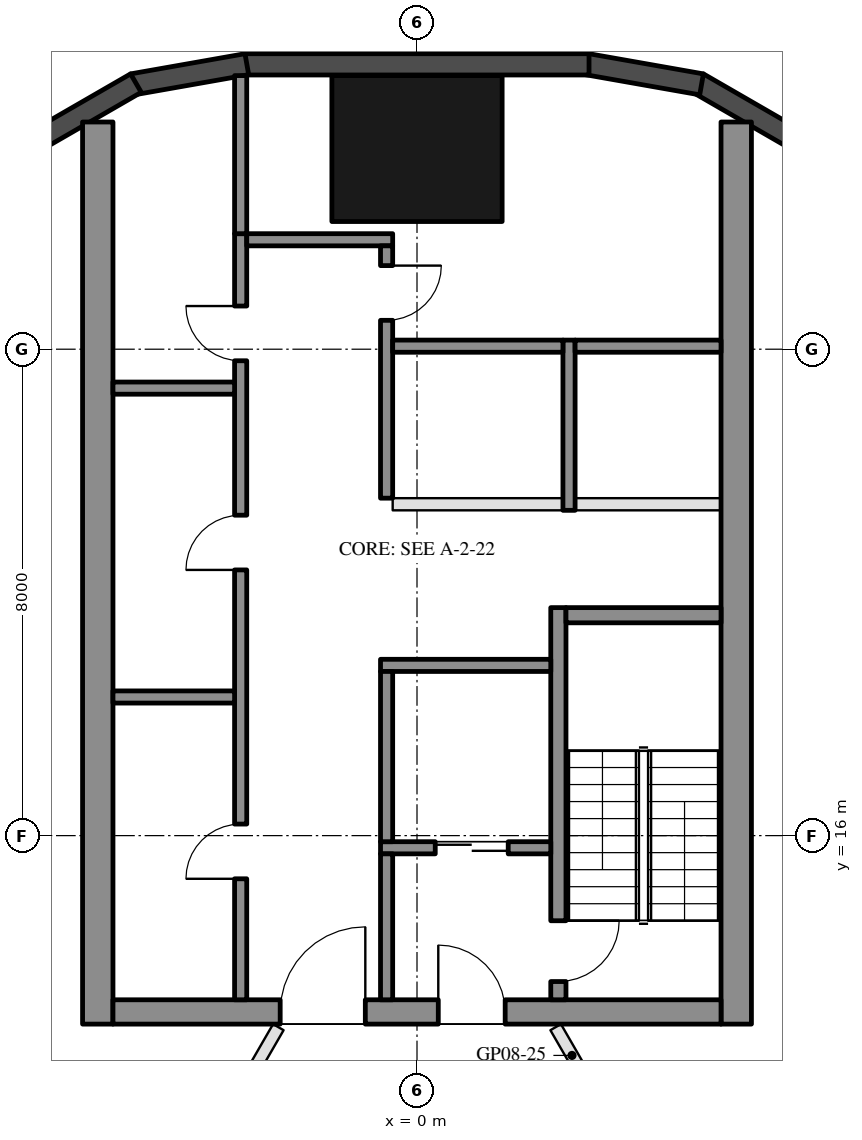
"""IFC4 building model, lengths in metres.
Left out: names, types, materials, properties, quantities, classifications, styles, units other than length and angle.
Written with IfcOpenShell. Run it as: python <this file> out.ifc"""

import sys

from ifc_helpers import new_model, si_unit, direction, frame, frame_2d, origin, origin_2d, place, context, subcontext, project, spatial, rectangle, hollow_rectangle, extrude, element, fill, save


model = new_model("IFC4")
c1 = context("Model", 3, precision=1e-05, world=origin(), true_north=direction((0.0, 1.0)))
c2 = subcontext(c1, "Body", "Model", "MODEL_VIEW")
j1 = project(units=[si_unit("LENGTHUNIT", "METRE"), si_unit("PLANEANGLEUNIT", "RADIAN")], contexts=[c1])
p1 = place(None, origin())
s1 = spatial("IfcSite", under=j1, at=p1, CompositionType="ELEMENT")
p2 = place(p1, origin())
s2 = spatial("IfcBuilding", under=s1, at=p2, CompositionType="ELEMENT")
p3 = place(p2, frame((0.0, 0.0, 102.0)))
s3 = spatial("IfcBuildingStorey", under=s2, at=p3, CompositionType="ELEMENT", Elevation=102.0)
p4 = place(p3, frame((0.0, 27.3, 0.0), z_axis=(0.0, 0.0, 1.0), x_axis=(1.0, 0.0, 0.0)))
e1 = element("IfcColumn", 1, at=p4, inside=s3, PredefinedType="COLUMN", context=c2, shape_type="SweptSolid", body=[
    extrude(hollow_rectangle(XDim=2.8, YDim=2.4, WallThickness=0.07, at=origin_2d()), origin(), (0.0, 0.0, 1.0), 3.7),
])
for number, where, z_axis, x_axis in (
    (2, (6.277, 27.422, 0.0), (0.0, 0.0, 1.0), (-0.866, 0.5, 0.0)),
    (3, (4.68, 28.356, 0.0), (0.0, 0.0, 1.0), (-0.985, 0.174, 0.0)),
):
    element("IfcWall", number, at=place(p3, frame(where, z_axis=z_axis, x_axis=x_axis)), inside=s3, PredefinedType="SOLIDWALL", context=c2, shape_type="SweptSolid", body=[
        extrude(rectangle(XDim=1.91, YDim=0.35, at=frame_2d((0.955, 0.0))), origin(), (0.0, 0.0, 1.0), 3.55),
    ])
p5 = place(p3, frame((2.829, 28.685, 0.0), z_axis=(0.0, 0.0, 1.0), x_axis=(-1.0, 0.0, 0.0)))
e4 = element("IfcWall", 4, at=p5, inside=s3, PredefinedType="SOLIDWALL", context=c2, shape_type="SweptSolid", body=[
    extrude(rectangle(XDim=5.658, YDim=0.35, at=frame_2d((2.829, 0.0))), origin(), (0.0, 0.0, 1.0), 3.55),
])
for number, where, z_axis, x_axis in (
    (5, (-2.799, 28.688, 0.0), (0.0, 0.0, 1.0), (-0.985, -0.174, 0.0)),
    (6, (-4.623, 28.377, 0.0), (0.0, 0.0, 1.0), (-0.866, -0.5, 0.0)),
):
    element("IfcWall", number, at=place(p3, frame(where, z_axis=z_axis, x_axis=x_axis)), inside=s3, PredefinedType="SOLIDWALL", context=c2, shape_type="SweptSolid", body=[
        extrude(rectangle(XDim=1.91, YDim=0.35, at=frame_2d((0.955, 0.0))), origin(), (0.0, 0.0, 1.0), 3.55),
    ])
for number, where, z_axis, x_axis in (
    (7, (5.25, 12.9, 0.0), (0.0, 0.0, 1.0), (0.0, 1.0, 0.0)),
    (8, (-5.25, 12.9, 0.0), (0.0, 0.0, 1.0), (0.0, 1.0, 0.0)),
):
    element("IfcWall", number, at=place(p3, frame(where, z_axis=z_axis, x_axis=x_axis)), inside=s3, PredefinedType="SHEAR", context=c2, shape_type="SweptSolid", body=[
        extrude(rectangle(XDim=14.837, YDim=0.5, at=frame_2d((7.418, 0.0))), origin(), (0.0, 0.0, 1.0), 3.5),
    ])
p6 = place(p3, frame((5.0, 13.1, 0.0), z_axis=(0.0, 0.0, 1.0), x_axis=(-1.0, 0.0, 0.0)))
e9 = element("IfcWall", 9, at=p6, inside=s3, PredefinedType="SHEAR", context=c2, shape_type="SweptSolid", body=[
    extrude(rectangle(XDim=10.0, YDim=0.4, at=frame_2d((5.0, 0.0))), origin(), (0.0, 0.0, 1.0), 3.5),
])
p7 = place(p6, frame((3.55, 0.0, 0.0)))
e10 = element("IfcOpeningElement", 10, at=p7, cuts=e9, PredefinedType="OPENING", context=c2, shape_type="SweptSolid", body=[
    extrude(rectangle(XDim=1.1, YDim=2.1, at=frame_2d((0.55, 1.05))), frame((0.0, 0.21, 0.0), z_axis=(0.0, -1.0, 0.0), x_axis=(1.0, 0.0, 0.0)), (0.0, 0.0, 1.0), 0.42),
])
p8 = place(p6, frame((5.85, 0.0, 0.0)))
e11 = element("IfcOpeningElement", 11, at=p8, cuts=e9, PredefinedType="OPENING", context=c2, shape_type="SweptSolid", body=[
    extrude(rectangle(XDim=1.4, YDim=2.1, at=frame_2d((0.7, 1.05))), frame((0.0, 0.21, 0.0), z_axis=(0.0, -1.0, 0.0), x_axis=(1.0, 0.0, 0.0)), (0.0, 0.0, 1.0), 0.42),
])
p9 = place(p3, frame((2.325, 13.3, 0.0), z_axis=(0.0, 0.0, 1.0), x_axis=(0.0, 1.0, 0.0)))
e12 = element("IfcWall", 12, at=p9, inside=s3, PredefinedType="SHEAR", context=c2, shape_type="SweptSolid", body=[
    extrude(rectangle(XDim=6.45, YDim=0.25, at=frame_2d((3.225, 0.0))), origin(), (0.0, 0.0, 1.0), 3.5),
])
p10 = place(p9, frame((0.3, 0.0, 0.0)))
e13 = element("IfcOpeningElement", 13, at=p10, cuts=e12, PredefinedType="OPENING", context=c2, shape_type="SweptSolid", body=[
    extrude(rectangle(XDim=1.0, YDim=2.1, at=frame_2d((0.5, 1.05))), frame((0.0, 0.135, 0.0), z_axis=(0.0, -1.0, 0.0), x_axis=(1.0, 0.0, 0.0)), (0.0, 0.0, 1.0), 0.27),
])
p11 = place(p3, frame((5.0, 19.625, 0.0), z_axis=(0.0, 0.0, 1.0), x_axis=(-1.0, 0.0, 0.0)))
e14 = element("IfcWall", 14, at=p11, inside=s3, PredefinedType="SHEAR", context=c2, shape_type="SweptSolid", body=[
    extrude(rectangle(XDim=2.55, YDim=0.25, at=frame_2d((1.275, 0.0))), origin(), (0.0, 0.0, 1.0), 3.5),
])
p12 = place(p3, frame((2.2, 18.8, 0.0), z_axis=(0.0, 0.0, 1.0), x_axis=(-1.0, 0.0, 0.0)))
e15 = element("IfcWall", 15, at=p12, inside=s3, PredefinedType="SHEAR", context=c2, shape_type="SweptSolid", body=[
    extrude(rectangle(XDim=2.8, YDim=0.2, at=frame_2d((1.4, 0.0))), origin(), (0.0, 0.0, 1.0), 3.5),
])
p13 = place(p3, frame((2.2, 15.8, 0.0), z_axis=(0.0, 0.0, 1.0), x_axis=(-1.0, 0.0, 0.0)))
e16 = element("IfcWall", 16, at=p13, inside=s3, PredefinedType="SHEAR", context=c2, shape_type="SweptSolid", body=[
    extrude(rectangle(XDim=2.8, YDim=0.2, at=frame_2d((1.4, 0.0))), origin(), (0.0, 0.0, 1.0), 3.5),
])
p14 = place(p13, frame((0.7, 0.0, 0.0)))
e17 = element("IfcOpeningElement", 17, at=p14, cuts=e16, PredefinedType="OPENING", context=c2, shape_type="SweptSolid", body=[
    extrude(rectangle(XDim=1.2, YDim=2.1, at=frame_2d((0.6, 1.05))), frame((0.0, 0.11, 0.0), z_axis=(0.0, -1.0, 0.0), x_axis=(1.0, 0.0, 0.0)), (0.0, 0.0, 1.0), 0.22),
])
p15 = place(p3, frame((-0.5, 15.9, 0.0), z_axis=(0.0, 0.0, 1.0), x_axis=(0.0, 1.0, 0.0)))
e18 = element("IfcWall", 18, at=p15, inside=s3, PredefinedType="SHEAR", context=c2, shape_type="SweptSolid", body=[
    extrude(rectangle(XDim=2.8, YDim=0.2, at=frame_2d((1.4, 0.0))), origin(), (0.0, 0.0, 1.0), 3.5),
])
p16 = place(p3, frame((-0.5, 13.3, 0.0), z_axis=(0.0, 0.0, 1.0), x_axis=(0.0, 1.0, 0.0)))
e19 = element("IfcWall", 19, at=p16, inside=s3, PredefinedType="SHEAR", context=c2, shape_type="SweptSolid", body=[
    extrude(rectangle(XDim=2.4, YDim=0.2, at=frame_2d((1.2, 0.0))), origin(), (0.0, 0.0, 1.0), 3.5),
])
p17 = place(p3, frame((-2.9, 13.3, 0.0), z_axis=(0.0, 0.0, 1.0), x_axis=(0.0, 1.0, 0.0)))
e20 = element("IfcWall", 20, at=p17, inside=s3, PredefinedType="SHEAR", context=c2, shape_type="SweptSolid", body=[
    extrude(rectangle(XDim=12.6, YDim=0.2, at=frame_2d((6.3, 0.0))), origin(), (0.0, 0.0, 1.0), 3.5),
])
p18 = place(p17, frame((1.99, 0.0, 0.0)))
e21 = element("IfcOpeningElement", 21, at=p18, cuts=e20, PredefinedType="OPENING", context=c2, shape_type="SweptSolid", body=[
    extrude(rectangle(XDim=0.9, YDim=2.1, at=frame_2d((0.45, 1.05))), frame((0.0, 0.11, 0.0), z_axis=(0.0, -1.0, 0.0), x_axis=(1.0, 0.0, 0.0)), (0.0, 0.0, 1.0), 0.22),
])
p19 = place(p17, frame((7.07, 0.0, 0.0)))
e22 = element("IfcOpeningElement", 22, at=p19, cuts=e20, PredefinedType="OPENING", context=c2, shape_type="SweptSolid", body=[
    extrude(rectangle(XDim=0.9, YDim=2.1, at=frame_2d((0.45, 1.05))), frame((0.0, 0.11, 0.0), z_axis=(0.0, -1.0, 0.0), x_axis=(1.0, 0.0, 0.0)), (0.0, 0.0, 1.0), 0.22),
])
p20 = place(p17, frame((10.51, 0.0, 0.0)))
e23 = element("IfcOpeningElement", 23, at=p20, cuts=e20, PredefinedType="OPENING", context=c2, shape_type="SweptSolid", body=[
    extrude(rectangle(XDim=0.9, YDim=2.1, at=frame_2d((0.45, 1.05))), frame((0.0, 0.11, 0.0), z_axis=(0.0, -1.0, 0.0), x_axis=(1.0, 0.0, 0.0)), (0.0, 0.0, 1.0), 0.22),
])
p21 = place(p3, frame((-0.4, 25.8, 0.0), z_axis=(0.0, 0.0, 1.0), x_axis=(-1.0, 0.0, 0.0)))
e24 = element("IfcWall", 24, at=p21, inside=s3, PredefinedType="SHEAR", context=c2, shape_type="SweptSolid", body=[
    extrude(rectangle(XDim=2.4, YDim=0.2, at=frame_2d((1.2, 0.0))), origin(), (0.0, 0.0, 1.0), 3.5),
])
p22 = place(p3, frame((-0.5, 21.55, 0.0), z_axis=(0.0, 0.0, 1.0), x_axis=(0.0, 1.0, 0.0)))
e25 = element("IfcWall", 25, at=p22, inside=s3, PredefinedType="SHEAR", context=c2, shape_type="SweptSolid", body=[
    extrude(rectangle(XDim=4.15, YDim=0.2, at=frame_2d((2.075, 0.0))), origin(), (0.0, 0.0, 1.0), 3.5),
])
p23 = place(p22, frame((2.925, 0.0, 0.0)))
e26 = element("IfcOpeningElement", 26, at=p23, cuts=e25, PredefinedType="OPENING", context=c2, shape_type="SweptSolid", body=[
    extrude(rectangle(XDim=0.9, YDim=2.1, at=frame_2d((0.45, 1.05))), frame((0.0, 0.11, 0.0), z_axis=(0.0, -1.0, 0.0), x_axis=(1.0, 0.0, 0.0)), (0.0, 0.0, 1.0), 0.22),
])
for number, where, z_axis, x_axis in (
    (27, (-3.0, 18.28, 0.0), (0.0, 0.0, 1.0), (-1.0, 0.0, 0.0)),
    (28, (-3.0, 23.36, 0.0), (0.0, 0.0, 1.0), (-1.0, 0.0, 0.0)),
):
    element("IfcWall", number, at=place(p3, frame(where, z_axis=z_axis, x_axis=x_axis)), inside=s3, PredefinedType="SHEAR", context=c2, shape_type="SweptSolid", body=[
        extrude(rectangle(XDim=2.0, YDim=0.2, at=frame_2d((1.0, 0.0))), origin(), (0.0, 0.0, 1.0), 3.5),
    ])
p24 = place(p3, frame((-2.9, 25.9, 0.0), z_axis=(0.0, 0.0, 1.0), x_axis=(0.0, 1.0, 0.0)))
e29 = element("IfcWall", 29, at=p24, inside=s3, PredefinedType="SHEAR", context=c2, shape_type="SweptSolid", body=[
    extrude(rectangle(XDim=2.6, YDim=0.2, at=frame_2d((1.3, 0.0))), origin(), (0.0, 0.0, 1.0), 3.5),
])
p25 = place(p3, frame((2.5, 21.35, 0.0), z_axis=(0.0, 0.0, 1.0), x_axis=(0.0, 1.0, 0.0)))
e30 = element("IfcWall", 30, at=p25, inside=s3, PredefinedType="SHEAR", context=c2, shape_type="SweptSolid", body=[
    extrude(rectangle(XDim=2.8, YDim=0.2, at=frame_2d((1.4, 0.0))), origin(), (0.0, 0.0, 1.0), 3.5),
])
p26 = place(p3, frame((5.0, 24.05, 0.0), z_axis=(0.0, 0.0, 1.0), x_axis=(-1.0, 0.0, 0.0)))
e31 = element("IfcWall", 31, at=p26, inside=s3, PredefinedType="SHEAR", context=c2, shape_type="SweptSolid", body=[
    extrude(rectangle(XDim=2.4, YDim=0.2, at=frame_2d((1.2, 0.0))), origin(), (0.0, 0.0, 1.0), 3.5),
])
p27 = place(p3, frame((2.4, 24.05, 0.0), z_axis=(0.0, 0.0, 1.0), x_axis=(-1.0, 0.0, 0.0)))
e32 = element("IfcWall", 32, at=p27, inside=s3, PredefinedType="SHEAR", context=c2, shape_type="SweptSolid", body=[
    extrude(rectangle(XDim=2.8, YDim=0.2, at=frame_2d((1.4, 0.0))), origin(), (0.0, 0.0, 1.0), 3.5),
])
p28 = place(p3, frame((5.0, 21.45, 0.0), z_axis=(0.0, 0.0, 1.0), x_axis=(-1.0, 0.0, 0.0)))
e33 = element("IfcWall", 33, at=p28, inside=s3, PredefinedType="PARTITIONING", context=c2, shape_type="SweptSolid", body=[
    extrude(rectangle(XDim=2.4, YDim=0.2, at=frame_2d((1.2, 0.0))), origin(), (0.0, 0.0, 1.0), 3.5),
])
p29 = place(p3, frame((2.4, 21.45, 0.0), z_axis=(0.0, 0.0, 1.0), x_axis=(-1.0, 0.0, 0.0)))
e34 = element("IfcWall", 34, at=p29, inside=s3, PredefinedType="PARTITIONING", context=c2, shape_type="SweptSolid", body=[
    extrude(rectangle(XDim=2.8, YDim=0.2, at=frame_2d((1.4, 0.0))), origin(), (0.0, 0.0, 1.0), 3.5),
])
p30 = place(p3, frame((14.722, 13.061, 0.0), z_axis=(0.0, 0.0, 1.0), x_axis=(-0.9249494111, -0.380090235214, 0.0)))
e35 = element("IfcWall", 35, at=p30, inside=s3, PredefinedType="PARTITIONING", context=c2, shape_type="SweptSolid", body=[
    extrude(rectangle(XDim=11.079, YDim=0.2, at=frame_2d((5.54, 0.0))), origin(), (0.0, 0.0, 1.0), 2.95),
])
p31 = place(p3, frame((-13.953, 12.593, 0.0), z_axis=(0.0, 0.0, 1.0), x_axis=(0.854198088033, -0.519947715065, 0.0)))
e36 = element("IfcWall", 36, at=p31, inside=s3, PredefinedType="PARTITIONING", context=c2, shape_type="SweptSolid", body=[
    extrude(rectangle(XDim=10.083, YDim=0.2, at=frame_2d((5.041, 0.0))), origin(), (0.0, 0.0, 1.0), 2.95),
])
p32 = place(p3, frame((2.281, 12.85, 0.0), z_axis=(0.0, 0.0, 1.0), x_axis=(0.499977539641, -0.866038370891, 0.0)))
e37 = element("IfcWall", 37, at=p32, inside=s3, PredefinedType="PARTITIONING", context=c2, shape_type="SweptSolid", body=[
    extrude(rectangle(XDim=4.474, YDim=0.2, at=frame_2d((2.237, 0.0))), origin(), (0.0, 0.0, 1.0), 2.95),
])
p33 = place(p32, frame((1.737, 0.0, 0.0)))
e38 = element("IfcOpeningElement", 38, at=p33, cuts=e37, PredefinedType="OPENING", context=c2, shape_type="SweptSolid", body=[
    extrude(rectangle(XDim=1.0, YDim=2.1, at=frame_2d((0.5, 1.05))), frame((0.0, 0.11, 0.0), z_axis=(0.0, -1.0, 0.0), x_axis=(1.0, 0.0, 0.0)), (0.0, 0.0, 1.0), 0.22),
])
p34 = place(p3, frame((-5.376, 7.489, 0.0), z_axis=(0.0, 0.0, 1.0), x_axis=(0.499998977725, 0.866025993994, 0.0)))
e39 = element("IfcWall", 39, at=p34, inside=s3, PredefinedType="PARTITIONING", context=c2, shape_type="SweptSolid", body=[
    extrude(rectangle(XDim=6.19, YDim=0.2, at=frame_2d((3.095, 0.0))), origin(), (0.0, 0.0, 1.0), 2.95),
])
p35 = place(p34, frame((2.595, 0.0, 0.0)))
e40 = element("IfcOpeningElement", 40, at=p35, cuts=e39, PredefinedType="OPENING", context=c2, shape_type="SweptSolid", body=[
    extrude(rectangle(XDim=1.0, YDim=2.1, at=frame_2d((0.5, 1.05))), frame((0.0, 0.11, 0.0), z_axis=(0.0, -1.0, 0.0), x_axis=(1.0, 0.0, 0.0)), (0.0, 0.0, 1.0), 0.22),
])
p36 = place(p14, origin())
e41 = element("IfcDoor", 41, at=p36, inside=s3, OperationType="DOUBLE_DOOR_SLIDING", PredefinedType="DOOR", context=c2, shape_type="SweptSolid", body=[
    extrude(rectangle(XDim=1.2, YDim=2.1, at=frame_2d((0.6, 1.05))), frame((0.0, 0.025, 0.0), z_axis=(0.0, -1.0, 0.0), x_axis=(1.0, 0.0, 0.0)), (0.0, 0.0, 1.0), 0.05),
])
fill(e17, e41)
p37 = place(p18, origin())
e42 = element("IfcDoor", 42, at=p37, inside=s3, OperationType="SINGLE_SWING_LEFT", PredefinedType="DOOR", context=c2, shape_type="SweptSolid", body=[
    extrude(rectangle(XDim=0.9, YDim=2.1, at=frame_2d((0.45, 1.05))), frame((0.0, 0.025, 0.0), z_axis=(0.0, -1.0, 0.0), x_axis=(1.0, 0.0, 0.0)), (0.0, 0.0, 1.0), 0.05),
])
fill(e21, e42)
p38 = place(p19, origin())
e43 = element("IfcDoor", 43, at=p38, inside=s3, OperationType="SINGLE_SWING_LEFT", PredefinedType="DOOR", context=c2, shape_type="SweptSolid", body=[
    extrude(rectangle(XDim=0.9, YDim=2.1, at=frame_2d((0.45, 1.05))), frame((0.0, 0.025, 0.0), z_axis=(0.0, -1.0, 0.0), x_axis=(1.0, 0.0, 0.0)), (0.0, 0.0, 1.0), 0.05),
])
fill(e22, e43)
p39 = place(p20, origin())
e44 = element("IfcDoor", 44, at=p39, inside=s3, OperationType="SINGLE_SWING_RIGHT", PredefinedType="DOOR", context=c2, shape_type="SweptSolid", body=[
    extrude(rectangle(XDim=0.9, YDim=2.1, at=frame_2d((0.45, 1.05))), frame((0.0, 0.025, 0.0), z_axis=(0.0, -1.0, 0.0), x_axis=(1.0, 0.0, 0.0)), (0.0, 0.0, 1.0), 0.05),
])
fill(e23, e44)
p40 = place(p23, frame((0.9, 0.0, 0.0), z_axis=(0.0, 0.0, 1.0), x_axis=(-1.0, 0.0, 0.0)))
e45 = element("IfcDoor", 45, at=p40, inside=s3, OperationType="SINGLE_SWING_LEFT", PredefinedType="DOOR", context=c2, shape_type="SweptSolid", body=[
    extrude(rectangle(XDim=0.9, YDim=2.1, at=frame_2d((0.45, 1.05))), frame((0.0, 0.025, 0.0), z_axis=(0.0, -1.0, 0.0), x_axis=(1.0, 0.0, 0.0)), (0.0, 0.0, 1.0), 0.05),
])
fill(e26, e45)
p41 = place(p7, frame((1.1, 0.0, 0.0), z_axis=(0.0, 0.0, 1.0), x_axis=(-1.0, 0.0, 0.0)))
e46 = element("IfcDoor", 46, at=p41, inside=s3, OperationType="SINGLE_SWING_LEFT", PredefinedType="DOOR", context=c2, shape_type="SweptSolid", body=[
    extrude(rectangle(XDim=1.1, YDim=2.1, at=frame_2d((0.55, 1.05))), frame((0.0, 0.025, 0.0), z_axis=(0.0, -1.0, 0.0), x_axis=(1.0, 0.0, 0.0)), (0.0, 0.0, 1.0), 0.05),
])
fill(e10, e46)
p42 = place(p8, frame((1.4, 0.0, 0.0), z_axis=(0.0, 0.0, 1.0), x_axis=(-1.0, 0.0, 0.0)))
e47 = element("IfcDoor", 47, at=p42, inside=s3, OperationType="DOUBLE_DOOR_SINGLE_SWING", PredefinedType="DOOR", context=c2, shape_type="SweptSolid", body=[
    extrude(rectangle(XDim=1.4, YDim=2.1, at=frame_2d((0.7, 1.05))), frame((0.0, 0.025, 0.0), z_axis=(0.0, -1.0, 0.0), x_axis=(1.0, 0.0, 0.0)), (0.0, 0.0, 1.0), 0.05),
])
fill(e11, e47)
p43 = place(p10, frame((1.0, 0.0, 0.0), z_axis=(0.0, 0.0, 1.0), x_axis=(-1.0, 0.0, 0.0)))
e48 = element("IfcDoor", 48, at=p43, inside=s3, OperationType="SINGLE_SWING_LEFT", PredefinedType="DOOR", context=c2, shape_type="SweptSolid", body=[
    extrude(rectangle(XDim=1.0, YDim=2.1, at=frame_2d((0.5, 1.05))), frame((0.0, 0.025, 0.0), z_axis=(0.0, -1.0, 0.0), x_axis=(1.0, 0.0, 0.0)), (0.0, 0.0, 1.0), 0.05),
])
fill(e13, e48)
save(model, sys.argv[1])
